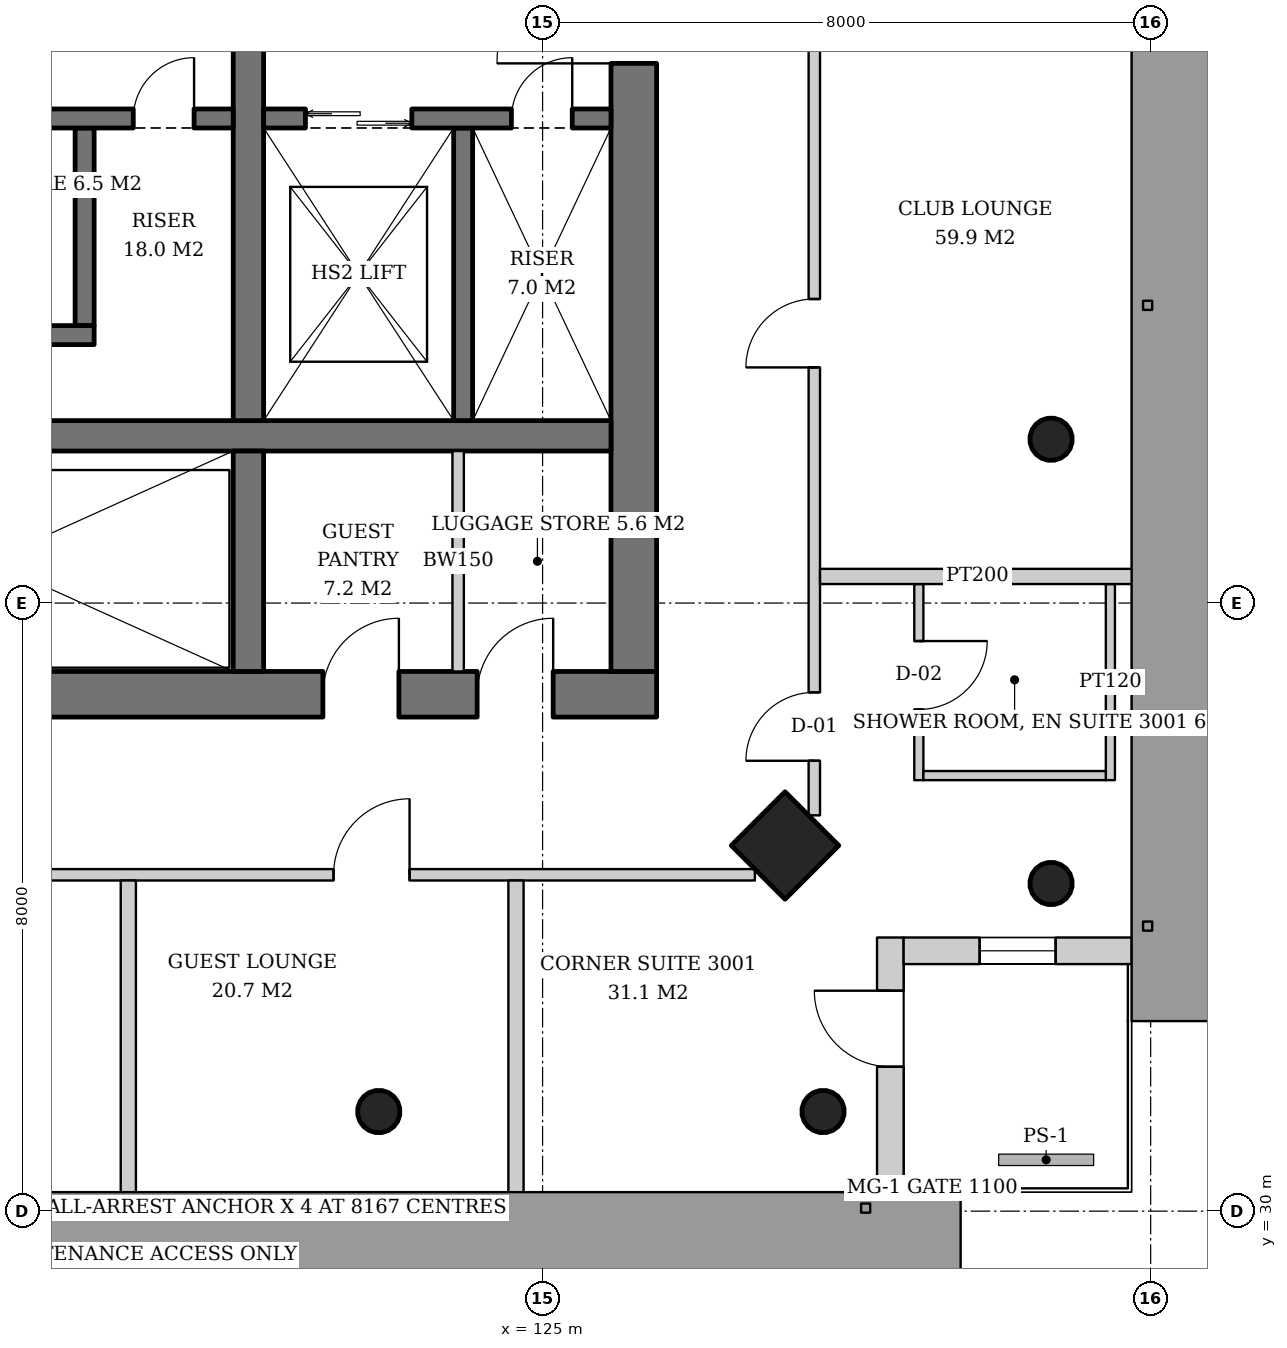
"""IFC4 building model, lengths in metres.
Left out: names, types, materials, properties, quantities, classifications, styles, units other than length and angle.
Written with IfcOpenShell. Run it as: python <this file> out.ifc"""

import sys

from ifc_helpers import new_model, si_unit, direction, frame, frame_2d, origin, origin_2d, place, context, subcontext, project, spatial, rectangle, hollow_circle, extrude, element, fill, save


model = new_model("IFC4")
c1 = context("Model", 3, precision=1e-05, world=origin(), true_north=direction((0.0, 1.0)))
c2 = subcontext(c1, "Body", "Model", "MODEL_VIEW")
j1 = project(units=[si_unit("LENGTHUNIT", "METRE"), si_unit("PLANEANGLEUNIT", "RADIAN")], contexts=[c1])
p1 = place(None, origin())
s1 = spatial("IfcSite", under=j1, at=p1, CompositionType="ELEMENT")
p2 = place(p1, origin())
s2 = spatial("IfcBuilding", under=s1, at=p2, CompositionType="ELEMENT")
p3 = place(p2, frame((0.0, 0.0, 119.8)))
s3 = spatial("IfcBuildingStorey", under=s2, at=p3, CompositionType="ELEMENT", Elevation=119.8)
p4 = place(p3, frame((131.741, 34.259, 0.0), z_axis=(-0.043029647111, 0.043029647111, 0.998146732169), x_axis=(-0.707106781187, -0.707106781187, 0.0)))
e1 = element("IfcColumn", 1, at=p4, inside=s3, PredefinedType="COLUMN", context=c2, shape_type="SweptSolid", body=[
    extrude(hollow_circle(Radius=0.28, WallThickness=0.02, at=origin_2d()), origin(), (0.0, 0.0, 1.0), 3.807),
])
p5 = place(p3, frame((131.741, 40.129, 0.0), z_axis=(-0.043059584825, 0.021497706284, 0.998841188968), x_axis=(-0.446680166538, -0.894693706707, 0.0)))
e2 = element("IfcColumn", 2, at=p5, inside=s3, PredefinedType="COLUMN", context=c2, shape_type="SweptSolid", body=[
    extrude(hollow_circle(Radius=0.28, WallThickness=0.02, at=origin_2d()), origin(), (0.0, 0.0, 1.0), 3.804),
])
p6 = place(p3, frame((128.241, 34.759, 0.0), z_axis=(-0.043029647111, 0.043029647111, 0.998146732169), x_axis=(-0.707106781187, -0.707106781187, 0.0)))
e3 = element("IfcColumn", 3, at=p6, inside=s3, PredefinedType="COLUMN", context=c2, shape_type="SweptSolid", body=[
    extrude(rectangle(XDim=1.0, YDim=1.0, at=origin_2d()), origin(), (0.0, 0.0, 1.0), 3.807),
])
p7 = place(p3, frame((128.741, 31.259, 0.0), z_axis=(-0.043029647111, 0.043029647111, 0.998146732169), x_axis=(-0.707106781187, -0.707106781187, 0.0)))
e4 = element("IfcColumn", 4, at=p7, inside=s3, PredefinedType="COLUMN", context=c2, shape_type="SweptSolid", body=[
    extrude(hollow_circle(Radius=0.28, WallThickness=0.02, at=origin_2d()), origin(), (0.0, 0.0, 1.0), 3.807),
])
p8 = place(p3, frame((122.871, 31.259, 0.0), z_axis=(-0.021497706284, 0.043059584825, 0.998841188968), x_axis=(-0.894693706707, -0.446680166538, 0.0)))
e5 = element("IfcColumn", 5, at=p8, inside=s3, PredefinedType="COLUMN", context=c2, shape_type="SweptSolid", body=[
    extrude(hollow_circle(Radius=0.28, WallThickness=0.02, at=origin_2d()), origin(), (0.0, 0.0, 1.0), 3.804),
])
p9 = place(p3, frame((107.5, 36.8, 0.0), z_axis=(0.0, 0.0, 1.0), x_axis=(1.0, 0.0, 0.0)))
e6 = element("IfcWall", 6, at=p9, inside=s3, PredefinedType="SHEAR", context=c2, shape_type="SweptSolid", body=[
    extrude(rectangle(XDim=19.0, YDim=0.6, at=frame_2d((9.5, 0.0))), origin(), (0.0, 0.0, 1.0), 3.8),
])
p10 = place(p9, frame((3.9, 0.0, 0.0)))
e7 = element("IfcOpeningElement", 7, at=p10, cuts=e6, PredefinedType="OPENING", context=c2, shape_type="SweptSolid", body=[
    extrude(rectangle(XDim=1.0, YDim=2.1, at=frame_2d((0.5, 1.05))), frame((0.0, 0.31, 0.0), z_axis=(0.0, -1.0, 0.0), x_axis=(1.0, 0.0, 0.0)), (0.0, 0.0, 1.0), 0.62),
])
p11 = place(p9, frame((14.61, 0.0, 0.0)))
e8 = element("IfcOpeningElement", 8, at=p11, cuts=e6, PredefinedType="OPENING", context=c2, shape_type="SweptSolid", body=[
    extrude(rectangle(XDim=1.0, YDim=2.1, at=frame_2d((0.5, 1.05))), frame((0.0, 0.31, 0.0), z_axis=(0.0, -1.0, 0.0), x_axis=(1.0, 0.0, 0.0)), (0.0, 0.0, 1.0), 0.62),
])
p12 = place(p9, frame((16.639, 0.0, 0.0)))
e9 = element("IfcOpeningElement", 9, at=p12, cuts=e6, PredefinedType="OPENING", context=c2, shape_type="SweptSolid", body=[
    extrude(rectangle(XDim=1.0, YDim=2.1, at=frame_2d((0.5, 1.05))), frame((0.0, 0.31, 0.0), z_axis=(0.0, -1.0, 0.0), x_axis=(1.0, 0.0, 0.0)), (0.0, 0.0, 1.0), 0.62),
])
p13 = place(p3, frame((126.2, 37.1, 0.0), z_axis=(0.0, 0.0, 1.0), x_axis=(0.0, 1.0, 0.0)))
e10 = element("IfcWall", 10, at=p13, inside=s3, PredefinedType="SHEAR", context=c2, shape_type="SweptSolid", body=[
    extrude(rectangle(XDim=17.8, YDim=0.6, at=frame_2d((8.9, 0.0))), origin(), (0.0, 0.0, 1.0), 3.8),
])
p14 = place(p13, frame((8.0, 0.0, 0.0)))
e11 = element("IfcOpeningElement", 11, at=p14, cuts=e10, PredefinedType="OPENING", context=c2, shape_type="SweptSolid", body=[
    extrude(rectangle(XDim=1.8, YDim=2.4, at=frame_2d((0.9, 1.2))), frame((0.0, 0.31, 0.0), z_axis=(0.0, -1.0, 0.0), x_axis=(1.0, 0.0, 0.0)), (0.0, 0.0, 1.0), 0.62),
])
p15 = place(p3, frame((108.1, 40.2, 0.0), z_axis=(0.0, 0.0, 1.0), x_axis=(1.0, 0.0, 0.0)))
e12 = element("IfcWall", 12, at=p15, inside=s3, PredefinedType="SHEAR", context=c2, shape_type="SweptSolid", body=[
    extrude(rectangle(XDim=17.8, YDim=0.4, at=frame_2d((8.9, 0.0))), origin(), (0.0, 0.0, 1.0), 3.8),
])
p16 = place(p3, frame((121.13, 37.1, 0.0), z_axis=(0.0, 0.0, 1.0), x_axis=(0.0, 1.0, 0.0)))
e13 = element("IfcWall", 13, at=p16, inside=s3, PredefinedType="SHEAR", context=c2, shape_type="SweptSolid", body=[
    extrude(rectangle(XDim=2.9, YDim=0.4, at=frame_2d((1.45, 0.0))), origin(), (0.0, 0.0, 1.0), 3.8),
])
p17 = place(p3, frame((121.13, 40.4, 0.0), z_axis=(0.0, 0.0, 1.0), x_axis=(0.0, 1.0, 0.0)))
e14 = element("IfcWall", 14, at=p17, inside=s3, PredefinedType="SHEAR", context=c2, shape_type="SweptSolid", body=[
    extrude(rectangle(XDim=11.2, YDim=0.4, at=frame_2d((5.6, 0.0))), origin(), (0.0, 0.0, 1.0), 3.8),
])
p18 = place(p3, frame((129.575, 30.25, 0.0), z_axis=(0.0, 0.0, 1.0), x_axis=(0.0, 1.0, 0.0)))
e15 = element("IfcWall", 15, at=p18, inside=s3, PredefinedType="SOLIDWALL", context=c2, shape_type="SweptSolid", body=[
    extrude(rectangle(XDim=3.35, YDim=0.35, at=frame_2d((1.675, 0.0))), origin(), (0.0, 0.0, 1.0), 3.6),
])
p19 = place(p18, frame((1.65, 0.0, 0.0)))
e16 = element("IfcOpeningElement", 16, at=p19, cuts=e15, PredefinedType="OPENING", context=c2, shape_type="SweptSolid", body=[
    extrude(rectangle(XDim=1.0, YDim=2.4, at=frame_2d((0.5, 1.2))), frame((0.0, 0.185, 0.0), z_axis=(0.0, -1.0, 0.0), x_axis=(1.0, 0.0, 0.0)), (0.0, 0.0, 1.0), 0.37),
])
p20 = place(p3, frame((129.75, 33.425, 0.0), z_axis=(0.0, 0.0, 1.0), x_axis=(1.0, 0.0, 0.0)))
e17 = element("IfcWall", 17, at=p20, inside=s3, PredefinedType="SOLIDWALL", context=c2, shape_type="SweptSolid", body=[
    extrude(rectangle(XDim=3.0, YDim=0.35, at=frame_2d((1.5, 0.0))), origin(), (0.0, 0.0, 1.0), 3.6),
])
p21 = place(p20, frame((1.0, 0.0, 0.9)))
e18 = element("IfcOpeningElement", 18, at=p21, cuts=e17, PredefinedType="OPENING", context=c2, shape_type="SweptSolid", body=[
    extrude(rectangle(XDim=1.0, YDim=2.4, at=frame_2d((0.5, 1.2))), frame((0.0, 0.185, 0.0), z_axis=(0.0, -1.0, 0.0), x_axis=(1.0, 0.0, 0.0)), (0.0, 0.0, 1.0), 0.37),
])
p22 = place(p3, frame((118.975, 44.25, 0.0), z_axis=(0.0, 0.0, 1.0), x_axis=(0.0, -1.0, 0.0)))
e19 = element("IfcWall", 19, at=p22, inside=s3, PredefinedType="SHEAR", context=c2, shape_type="SweptSolid", body=[
    extrude(rectangle(XDim=2.6, YDim=0.25, at=frame_2d((1.3, 0.0))), origin(), (0.0, 0.0, 1.0), 3.8),
])
p23 = place(p3, frame((108.1, 41.525, 0.0), z_axis=(0.0, 0.0, 1.0), x_axis=(1.0, 0.0, 0.0)))
e20 = element("IfcWall", 20, at=p23, inside=s3, PredefinedType="SHEAR", context=c2, shape_type="SweptSolid", body=[
    extrude(rectangle(XDim=11.0, YDim=0.25, at=frame_2d((5.5, 0.0))), origin(), (0.0, 0.0, 1.0), 3.8),
])
p24 = place(p3, frame((108.1, 44.375, 0.0), z_axis=(0.0, 0.0, 1.0), x_axis=(1.0, 0.0, 0.0)))
e21 = element("IfcWall", 21, at=p24, inside=s3, PredefinedType="SHEAR", context=c2, shape_type="SweptSolid", body=[
    extrude(rectangle(XDim=12.83, YDim=0.25, at=frame_2d((6.415, 0.0))), origin(), (0.0, 0.0, 1.0), 3.8),
])
p25 = place(p24, frame((0.7, 0.0, 0.0)))
e22 = element("IfcOpeningElement", 22, at=p25, cuts=e21, PredefinedType="OPENING", context=c2, shape_type="SweptSolid", body=[
    extrude(rectangle(XDim=1.1, YDim=2.2, at=frame_2d((0.55, 1.1))), frame((0.0, 0.135, 0.0), z_axis=(0.0, -1.0, 0.0), x_axis=(1.0, 0.0, 0.0)), (0.0, 0.0, 1.0), 0.27),
])
p26 = place(p24, frame((3.45, 0.0, 0.0)))
e23 = element("IfcOpeningElement", 23, at=p26, cuts=e21, PredefinedType="OPENING", context=c2, shape_type="SweptSolid", body=[
    extrude(rectangle(XDim=1.1, YDim=2.2, at=frame_2d((0.55, 1.1))), frame((0.0, 0.135, 0.0), z_axis=(0.0, -1.0, 0.0), x_axis=(1.0, 0.0, 0.0)), (0.0, 0.0, 1.0), 0.27),
])
p27 = place(p24, frame((6.2, 0.0, 0.0)))
e24 = element("IfcOpeningElement", 24, at=p27, cuts=e21, PredefinedType="OPENING", context=c2, shape_type="SweptSolid", body=[
    extrude(rectangle(XDim=1.1, YDim=2.2, at=frame_2d((0.55, 1.1))), frame((0.0, 0.135, 0.0), z_axis=(0.0, -1.0, 0.0), x_axis=(1.0, 0.0, 0.0)), (0.0, 0.0, 1.0), 0.27),
])
p28 = place(p24, frame((9.0, 0.0, 0.0)))
e25 = element("IfcOpeningElement", 25, at=p28, cuts=e21, PredefinedType="OPENING", context=c2, shape_type="SweptSolid", body=[
    extrude(rectangle(XDim=1.0, YDim=2.1, at=frame_2d((0.5, 1.05))), frame((0.0, 0.135, 0.0), z_axis=(0.0, -1.0, 0.0), x_axis=(1.0, 0.0, 0.0)), (0.0, 0.0, 1.0), 0.27),
])
p29 = place(p24, frame((11.515, 0.0, 0.0)))
e26 = element("IfcOpeningElement", 26, at=p29, cuts=e21, PredefinedType="OPENING", context=c2, shape_type="SweptSolid", body=[
    extrude(rectangle(XDim=0.8, YDim=2.0, at=frame_2d((0.4, 1.0))), frame((0.0, 0.135, 0.0), z_axis=(0.0, -1.0, 0.0), x_axis=(1.0, 0.0, 0.0)), (0.0, 0.0, 1.0), 0.27),
])
p30 = place(p3, frame((123.955, 44.25, 0.0), z_axis=(0.0, 0.0, 1.0), x_axis=(0.0, -1.0, 0.0)))
e27 = element("IfcWall", 27, at=p30, inside=s3, PredefinedType="SHEAR", context=c2, shape_type="SweptSolid", body=[
    extrude(rectangle(XDim=3.85, YDim=0.25, at=frame_2d((1.925, 0.0))), origin(), (0.0, 0.0, 1.0), 3.8),
])
p31 = place(p3, frame((121.33, 44.375, 0.0), z_axis=(0.0, 0.0, 1.0), x_axis=(1.0, 0.0, 0.0)))
e28 = element("IfcWall", 28, at=p31, inside=s3, PredefinedType="SHEAR", context=c2, shape_type="SweptSolid", body=[
    extrude(rectangle(XDim=4.57, YDim=0.25, at=frame_2d((2.285, 0.0))), origin(), (0.0, 0.0, 1.0), 3.8),
])
p32 = place(p31, frame((0.55, 0.0, 0.0)))
e29 = element("IfcOpeningElement", 29, at=p32, cuts=e28, PredefinedType="OPENING", context=c2, shape_type="SweptSolid", body=[
    extrude(rectangle(XDim=1.4, YDim=2.4, at=frame_2d((0.7, 1.2))), frame((0.0, 0.135, 0.0), z_axis=(0.0, -1.0, 0.0), x_axis=(1.0, 0.0, 0.0)), (0.0, 0.0, 1.0), 0.27),
])
p33 = place(p31, frame((3.26, 0.0, 0.0)))
e30 = element("IfcOpeningElement", 30, at=p33, cuts=e28, PredefinedType="OPENING", context=c2, shape_type="SweptSolid", body=[
    extrude(rectangle(XDim=0.8, YDim=2.0, at=frame_2d((0.4, 1.0))), frame((0.0, 0.135, 0.0), z_axis=(0.0, -1.0, 0.0), x_axis=(1.0, 0.0, 0.0)), (0.0, 0.0, 1.0), 0.27),
])
p34 = place(p3, frame((123.889, 37.1, 0.0), z_axis=(0.0, 0.0, 1.0), x_axis=(0.0, 1.0, 0.0)))
e31 = element("IfcWall", 31, at=p34, inside=s3, PredefinedType="SOLIDWALL", context=c2, shape_type="SweptSolid", body=[
    extrude(rectangle(XDim=2.9, YDim=0.15, at=frame_2d((1.45, 0.0))), origin(), (0.0, 0.0, 1.0), 3.6),
])
p35 = place(p3, frame((129.95, 38.25, 0.0), z_axis=(0.0, 0.0, 1.0), x_axis=(0.0, -1.0, 0.0)))
e32 = element("IfcWall", 32, at=p35, inside=s3, PredefinedType="PARTITIONING", context=c2, shape_type="SweptSolid", body=[
    extrude(rectangle(XDim=2.58, YDim=0.12, at=frame_2d((1.29, 0.0))), origin(), (0.0, 0.0, 1.0), 2.9),
])
p36 = place(p35, frame((0.75, 0.0, 0.0)))
e33 = element("IfcOpeningElement", 33, at=p36, cuts=e32, PredefinedType="OPENING", context=c2, shape_type="SweptSolid", body=[
    extrude(rectangle(XDim=0.9, YDim=2.1, at=frame_2d((0.45, 1.05))), frame((0.0, 0.07, 0.0), z_axis=(0.0, -1.0, 0.0), x_axis=(1.0, 0.0, 0.0)), (0.0, 0.0, 1.0), 0.14),
])
p37 = place(p3, frame((132.47, 38.25, 0.0), z_axis=(0.0, 0.0, 1.0), x_axis=(0.0, -1.0, 0.0)))
e34 = element("IfcWall", 34, at=p37, inside=s3, PredefinedType="PARTITIONING", context=c2, shape_type="SweptSolid", body=[
    extrude(rectangle(XDim=2.58, YDim=0.12, at=frame_2d((1.29, 0.0))), origin(), (0.0, 0.0, 1.0), 3.6),
])
p38 = place(p3, frame((130.01, 35.73, 0.0), z_axis=(0.0, 0.0, 1.0), x_axis=(1.0, 0.0, 0.0)))
e35 = element("IfcWall", 35, at=p38, inside=s3, PredefinedType="PARTITIONING", context=c2, shape_type="SweptSolid", body=[
    extrude(rectangle(XDim=2.4, YDim=0.12, at=frame_2d((1.2, 0.0))), origin(), (0.0, 0.0, 1.0), 3.2),
])
p39 = place(p3, frame((128.575, 35.207, 0.0), z_axis=(0.0, 0.0, 1.0), x_axis=(0.0, 1.0, 0.0)))
e36 = element("IfcWall", 36, at=p39, inside=s3, PredefinedType="PARTITIONING", context=c2, shape_type="SweptSolid", body=[
    extrude(rectangle(XDim=21.586, YDim=0.15, at=frame_2d((10.793, 0.0))), origin(), (0.0, 0.0, 1.0), 2.9),
])
p40 = place(p39, frame((0.718, 0.0, 0.0)))
e37 = element("IfcOpeningElement", 37, at=p40, cuts=e36, PredefinedType="OPENING", context=c2, shape_type="SweptSolid", body=[
    extrude(rectangle(XDim=0.9, YDim=2.1, at=frame_2d((0.45, 1.05))), frame((0.0, 0.085, 0.0), z_axis=(0.0, -1.0, 0.0), x_axis=(1.0, 0.0, 0.0)), (0.0, 0.0, 1.0), 0.17),
])
p41 = place(p39, frame((5.893, 0.0, 0.0)))
e38 = element("IfcOpeningElement", 38, at=p41, cuts=e36, PredefinedType="OPENING", context=c2, shape_type="SweptSolid", body=[
    extrude(rectangle(XDim=0.9, YDim=2.1, at=frame_2d((0.45, 1.05))), frame((0.0, 0.085, 0.0), z_axis=(0.0, -1.0, 0.0), x_axis=(1.0, 0.0, 0.0)), (0.0, 0.0, 1.0), 0.17),
])
p42 = place(p3, frame((128.65, 38.35, 0.0), z_axis=(0.0, 0.0, 1.0), x_axis=(1.0, 0.0, 0.0)))
e39 = element("IfcWall", 39, at=p42, inside=s3, PredefinedType="PARTITIONING", context=c2, shape_type="SweptSolid", body=[
    extrude(rectangle(XDim=4.14, YDim=0.2, at=frame_2d((2.07, 0.0))), origin(), (0.0, 0.0, 1.0), 3.2),
])
p43 = place(p3, frame((106.207, 34.425, 0.0), z_axis=(0.0, 0.0, 1.0), x_axis=(1.0, 0.0, 0.0)))
e40 = element("IfcWall", 40, at=p43, inside=s3, PredefinedType="PARTITIONING", context=c2, shape_type="SweptSolid", body=[
    extrude(rectangle(XDim=21.586, YDim=0.15, at=frame_2d((10.793, 0.0))), origin(), (0.0, 0.0, 1.0), 2.9),
])
p44 = place(p43, frame((0.718, 0.0, 0.0)))
e41 = element("IfcOpeningElement", 41, at=p44, cuts=e40, PredefinedType="OPENING", context=c2, shape_type="SweptSolid", body=[
    extrude(rectangle(XDim=0.9, YDim=2.1, at=frame_2d((0.45, 1.05))), frame((0.0, 0.085, 0.0), z_axis=(0.0, -1.0, 0.0), x_axis=(1.0, 0.0, 0.0)), (0.0, 0.0, 1.0), 0.17),
])
p45 = place(p43, frame((5.893, 0.0, 0.0)))
e42 = element("IfcOpeningElement", 42, at=p45, cuts=e40, PredefinedType="OPENING", context=c2, shape_type="SweptSolid", body=[
    extrude(rectangle(XDim=0.9, YDim=2.1, at=frame_2d((0.45, 1.05))), frame((0.0, 0.085, 0.0), z_axis=(0.0, -1.0, 0.0), x_axis=(1.0, 0.0, 0.0)), (0.0, 0.0, 1.0), 0.17),
])
p46 = place(p43, frame((16.043, 0.0, 0.0)))
e43 = element("IfcOpeningElement", 43, at=p46, cuts=e40, PredefinedType="OPENING", context=c2, shape_type="SweptSolid", body=[
    extrude(rectangle(XDim=1.0, YDim=2.1, at=frame_2d((0.5, 1.05))), frame((0.0, 0.085, 0.0), z_axis=(0.0, -1.0, 0.0), x_axis=(1.0, 0.0, 0.0)), (0.0, 0.0, 1.0), 0.17),
])
p47 = place(p3, frame((119.55, 34.35, 0.0), z_axis=(0.0, 0.0, 1.0), x_axis=(0.0, -1.0, 0.0)))
e44 = element("IfcWall", 44, at=p47, inside=s3, PredefinedType="PARTITIONING", context=c2, shape_type="SweptSolid", body=[
    extrude(rectangle(XDim=4.14, YDim=0.2, at=frame_2d((2.07, 0.0))), origin(), (0.0, 0.0, 1.0), 3.0),
])
p48 = place(p3, frame((124.65, 34.35, 0.0), z_axis=(0.0, 0.0, 1.0), x_axis=(0.0, -1.0, 0.0)))
e45 = element("IfcWall", 45, at=p48, inside=s3, PredefinedType="PARTITIONING", context=c2, shape_type="SweptSolid", body=[
    extrude(rectangle(XDim=4.14, YDim=0.2, at=frame_2d((2.07, 0.0))), origin(), (0.0, 0.0, 1.0), 3.2),
])
p49 = place(p19, origin())
e46 = element("IfcDoor", 46, at=p49, inside=s3, OperationType="SINGLE_SWING_RIGHT", PredefinedType="DOOR", context=c2, shape_type="SweptSolid", body=[
    extrude(rectangle(XDim=1.0, YDim=2.4, at=frame_2d((0.5, 1.2))), frame((0.0, 0.025, 0.0), z_axis=(0.0, -1.0, 0.0), x_axis=(1.0, 0.0, 0.0)), (0.0, 0.0, 1.0), 0.05),
])
fill(e16, e46)
p50 = place(p21, origin())
e47 = element("IfcWindow", 47, at=p50, inside=s3, PartitioningType="SINGLE_PANEL", PredefinedType="WINDOW", context=c2, shape_type="SweptSolid", body=[
    extrude(rectangle(XDim=1.0, YDim=2.4, at=frame_2d((0.5, 1.2))), frame((0.0, 0.03, 0.0), z_axis=(0.0, -1.0, 0.0), x_axis=(1.0, 0.0, 0.0)), (0.0, 0.0, 1.0), 0.06),
])
fill(e18, e47)
p51 = place(p29, origin())
e48 = element("IfcDoor", 48, at=p51, inside=s3, OperationType="SINGLE_SWING_RIGHT", PredefinedType="DOOR", context=c2, shape_type="SweptSolid", body=[
    extrude(rectangle(XDim=0.8, YDim=2.0, at=frame_2d((0.4, 1.0))), frame((0.0, 0.025, 0.0), z_axis=(0.0, -1.0, 0.0), x_axis=(1.0, 0.0, 0.0)), (0.0, 0.0, 1.0), 0.05),
])
fill(e26, e48)
p52 = place(p32, origin())
e49 = element("IfcDoor", 49, at=p52, inside=s3, OperationType="DOUBLE_DOOR_SLIDING", PredefinedType="DOOR", context=c2, shape_type="SweptSolid", body=[
    extrude(rectangle(XDim=1.4, YDim=2.4, at=frame_2d((0.7, 1.2))), frame((0.0, 0.025, 0.0), z_axis=(0.0, -1.0, 0.0), x_axis=(1.0, 0.0, 0.0)), (0.0, 0.0, 1.0), 0.05),
])
fill(e29, e49)
p53 = place(p33, origin())
e50 = element("IfcDoor", 50, at=p53, inside=s3, OperationType="SINGLE_SWING_RIGHT", PredefinedType="DOOR", context=c2, shape_type="SweptSolid", body=[
    extrude(rectangle(XDim=0.8, YDim=2.0, at=frame_2d((0.4, 1.0))), frame((0.0, 0.025, 0.0), z_axis=(0.0, -1.0, 0.0), x_axis=(1.0, 0.0, 0.0)), (0.0, 0.0, 1.0), 0.05),
])
fill(e30, e50)
p54 = place(p14, origin())
e51 = element("IfcDoor", 51, at=p54, inside=s3, OperationType="DOUBLE_DOOR_SINGLE_SWING", PredefinedType="DOOR", context=c2, shape_type="SweptSolid", body=[
    extrude(rectangle(XDim=1.8, YDim=2.4, at=frame_2d((0.9, 1.2))), frame((0.0, 0.025, 0.0), z_axis=(0.0, -1.0, 0.0), x_axis=(1.0, 0.0, 0.0)), (0.0, 0.0, 1.0), 0.05),
])
fill(e11, e51)
p55 = place(p11, origin())
e52 = element("IfcDoor", 52, at=p55, inside=s3, OperationType="SINGLE_SWING_RIGHT", PredefinedType="DOOR", context=c2, shape_type="SweptSolid", body=[
    extrude(rectangle(XDim=1.0, YDim=2.1, at=frame_2d((0.5, 1.05))), frame((0.0, 0.29, 0.0), z_axis=(0.0, -1.0, 0.0), x_axis=(1.0, 0.0, 0.0)), (0.0, 0.0, 1.0), 0.05),
])
fill(e8, e52)
p56 = place(p12, origin())
e53 = element("IfcDoor", 53, at=p56, inside=s3, OperationType="SINGLE_SWING_RIGHT", PredefinedType="DOOR", context=c2, shape_type="SweptSolid", body=[
    extrude(rectangle(XDim=1.0, YDim=2.1, at=frame_2d((0.5, 1.05))), frame((0.0, 0.29, 0.0), z_axis=(0.0, -1.0, 0.0), x_axis=(1.0, 0.0, 0.0)), (0.0, 0.0, 1.0), 0.05),
])
fill(e9, e53)
p57 = place(p36, origin())
e54 = element("IfcDoor", 54, at=p57, inside=s3, OperationType="SINGLE_SWING_LEFT", PredefinedType="DOOR", context=c2, shape_type="SweptSolid", body=[
    extrude(rectangle(XDim=0.9, YDim=2.1, at=frame_2d((0.45, 1.05))), frame((0.0, 0.025, 0.0), z_axis=(0.0, -1.0, 0.0), x_axis=(1.0, 0.0, 0.0)), (0.0, 0.0, 1.0), 0.05),
])
fill(e33, e54)
p58 = place(p40, origin())
e55 = element("IfcDoor", 55, at=p58, inside=s3, OperationType="SINGLE_SWING_LEFT", PredefinedType="DOOR", context=c2, shape_type="SweptSolid", body=[
    extrude(rectangle(XDim=0.9, YDim=2.1, at=frame_2d((0.45, 1.05))), frame((0.0, 0.025, 0.0), z_axis=(0.0, -1.0, 0.0), x_axis=(1.0, 0.0, 0.0)), (0.0, 0.0, 1.0), 0.05),
])
fill(e37, e55)
p59 = place(p41, origin())
e56 = element("IfcDoor", 56, at=p59, inside=s3, OperationType="SINGLE_SWING_LEFT", PredefinedType="DOOR", context=c2, shape_type="SweptSolid", body=[
    extrude(rectangle(XDim=0.9, YDim=2.1, at=frame_2d((0.45, 1.05))), frame((0.0, 0.025, 0.0), z_axis=(0.0, -1.0, 0.0), x_axis=(1.0, 0.0, 0.0)), (0.0, 0.0, 1.0), 0.05),
])
fill(e38, e56)
p60 = place(p46, origin())
e57 = element("IfcDoor", 57, at=p60, inside=s3, OperationType="SINGLE_SWING_RIGHT", PredefinedType="DOOR", context=c2, shape_type="SweptSolid", body=[
    extrude(rectangle(XDim=1.0, YDim=2.1, at=frame_2d((0.5, 1.05))), frame((0.0, 0.025, 0.0), z_axis=(0.0, -1.0, 0.0), x_axis=(1.0, 0.0, 0.0)), (0.0, 0.0, 1.0), 0.05),
])
fill(e43, e57)
save(model, sys.argv[1])
